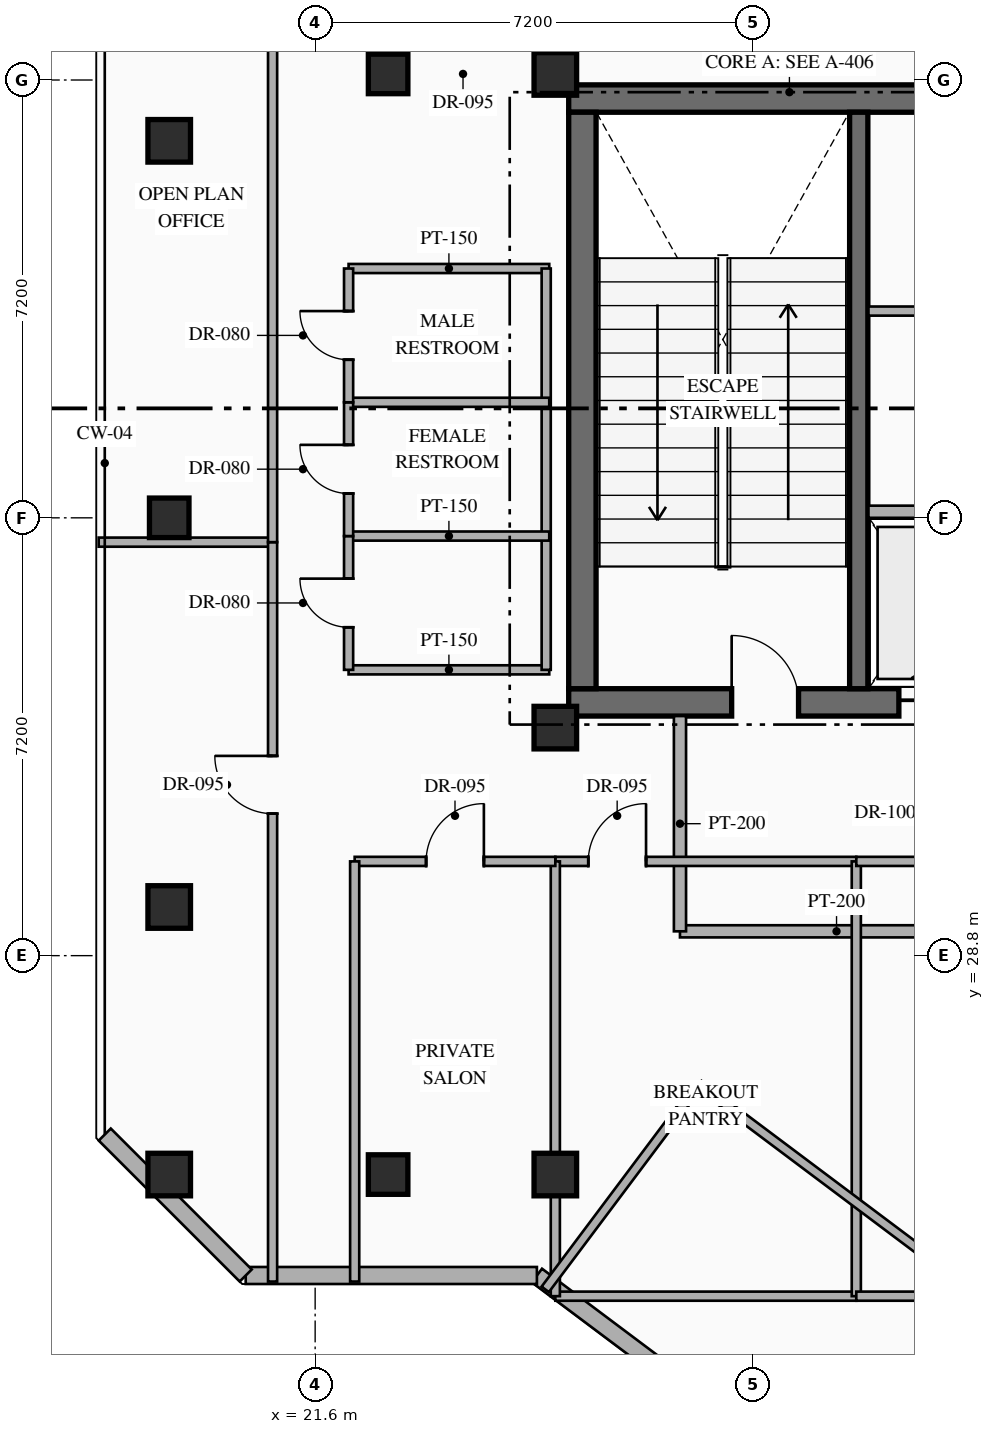
"""IFC4 building model, lengths in metres.
Left out: names, types, materials, properties, quantities, classifications, styles, units other than length and angle.
Written with IfcOpenShell. Run it as: python <this file> out.ifc"""

import sys

from ifc_helpers import new_model, si_unit, direction, frame, frame_2d, origin, origin_2d, place, context, subcontext, project, spatial, rectangle, hollow_rectangle, extrude, element, fill, save


model = new_model("IFC4")
c1 = context("Model", 3, precision=1e-05, world=origin(), true_north=direction((0.0, 1.0)))
c2 = subcontext(c1, "Body", "Model", "MODEL_VIEW")
j1 = project(units=[si_unit("LENGTHUNIT", "METRE"), si_unit("PLANEANGLEUNIT", "RADIAN")], contexts=[c1])
p1 = place(None, origin())
s1 = spatial("IfcSite", under=j1, at=p1, CompositionType="ELEMENT")
p2 = place(p1, origin())
s2 = spatial("IfcBuilding", under=s1, at=p2, CompositionType="ELEMENT")
p3 = place(p2, frame((0.0, 0.0, 234.75)))
s3 = spatial("IfcBuildingStorey", under=s2, at=p3, CompositionType="ELEMENT", Elevation=234.75)
p4 = place(p3, frame((25.77, 32.965, 0.0), z_axis=(0.0, 0.0, 1.0), x_axis=(1.0, 0.0, 0.0)))
e1 = element("IfcWall", 1, at=p4, inside=s3, PredefinedType="SHEAR", context=c2, shape_type="SweptSolid", body=[
    extrude(rectangle(XDim=7.48, YDim=0.45, at=frame_2d((3.74, 0.0))), origin(), (0.0, 0.0, 1.0), 4.8),
])
p5 = place(p4, frame((2.68, 0.0, 0.0)))
e2 = element("IfcOpeningElement", 2, at=p5, cuts=e1, PredefinedType="OPENING", context=c2, shape_type="SweptSolid", body=[
    extrude(rectangle(XDim=1.1, YDim=2.2, at=frame_2d((0.55, 1.1))), frame((0.0, 0.235, 0.0), z_axis=(0.0, -1.0, 0.0), x_axis=(1.0, 0.0, 0.0)), (0.0, 0.0, 1.0), 0.47),
])
p6 = place(p4, frame((5.43, 0.0, 0.0)))
e3 = element("IfcOpeningElement", 3, at=p6, cuts=e1, PredefinedType="OPENING", context=c2, shape_type="SweptSolid", body=[
    extrude(rectangle(XDim=1.1, YDim=2.15, at=frame_2d((0.55, 1.075))), frame((0.0, 0.235, 0.0), z_axis=(0.0, -1.0, 0.0), x_axis=(1.0, 0.0, 0.0)), (0.0, 0.0, 1.0), 0.47),
])
p7 = place(p3, frame((25.77, 42.895, 0.0), z_axis=(0.0, 0.0, 1.0), x_axis=(1.0, 0.0, 0.0)))
e4 = element("IfcWall", 4, at=p7, inside=s3, PredefinedType="SHEAR", context=c2, shape_type="SweptSolid", body=[
    extrude(rectangle(XDim=7.48, YDim=0.45, at=frame_2d((3.74, 0.0))), origin(), (0.0, 0.0, 1.0), 4.8),
])
p8 = place(p3, frame((25.995, 33.19, 0.0), z_axis=(0.0, 0.0, 1.0), x_axis=(0.0, 1.0, 0.0)))
e5 = element("IfcWall", 5, at=p8, inside=s3, PredefinedType="SHEAR", context=c2, shape_type="SweptSolid", body=[
    extrude(rectangle(XDim=9.48, YDim=0.45, at=frame_2d((4.74, 0.0))), origin(), (0.0, 0.0, 1.0), 4.8),
])
p9 = place(p3, frame((30.54, 33.19, 0.0), z_axis=(0.0, 0.0, 1.0), x_axis=(0.0, 1.0, 0.0)))
e6 = element("IfcWall", 6, at=p9, inside=s3, PredefinedType="SHEAR", context=c2, shape_type="SweptSolid", body=[
    extrude(rectangle(XDim=9.48, YDim=0.3, at=frame_2d((4.74, 0.0))), origin(), (0.0, 0.0, 1.0), 4.8),
])
for number, where, z_axis, x_axis in (
    (7, (25.55, 32.55, 0.0), (0.0, 0.0, 1.0), (1.0, 0.0, 0.0)),
    (8, (25.55, 43.3, 0.0), (0.0, 0.0, 1.0), (1.0, 0.0, 0.0)),
    (9, (25.55, 25.2, 0.0), (0.0, 0.0, 1.0), (1.0, 0.0, 0.0)),
    (10, (19.2, 25.2, 0.0), (0.0, 0.0, 1.0), (1.0, 0.0, 0.0)),
    (11, (19.2, 29.6, 0.0), (0.0, 0.0, 1.0), (1.0, 0.0, 0.0)),
    (12, (19.2, 42.2, 0.0), (0.0, 0.0, 1.0), (1.0, 0.0, 0.0)),
):
    element("IfcColumn", number, at=place(p3, frame(where, z_axis=z_axis, x_axis=x_axis)), inside=s3, PredefinedType="COLUMN", context=c2, shape_type="SweptSolid", body=[
        extrude(hollow_rectangle(XDim=0.7, YDim=0.7, WallThickness=0.028, at=origin_2d()), origin(), (0.0, 0.0, 1.0), 4.8),
    ])
for number, where, z_axis, x_axis in (
    (13, (22.8, 25.2, 0.0), (0.0, 0.0, 1.0), (1.0, 0.0, 0.0)),
    (14, (22.8, 43.3, 0.0), (0.0, 0.0, 1.0), (1.0, 0.0, 0.0)),
    (15, (19.2, 36.0, 0.0), (0.0, 0.0, 1.0), (1.0, 0.0, 0.0)),
):
    element("IfcColumn", number, at=place(p3, frame(where, z_axis=z_axis, x_axis=x_axis)), inside=s3, PredefinedType="COLUMN", context=c2, shape_type="SweptSolid", body=[
        extrude(hollow_rectangle(XDim=0.65, YDim=0.65, WallThickness=0.025, at=origin_2d()), origin(), (0.0, 0.0, 1.0), 4.8),
    ])
p10 = place(p3, frame((37.718, 14.187, 0.0), z_axis=(0.0, 0.0, 1.0), x_axis=(-0.800005638109, 0.599992482448, 0.0)))
e16 = element("IfcWall", 16, at=p10, inside=s3, PredefinedType="STANDARD", context=c2, shape_type="SweptSolid", body=[
    extrude(rectangle(XDim=15.589, YDim=0.28, at=frame_2d((7.794, 0.0))), origin(), (0.0, 0.0, 1.0), 4.55),
])
p11 = place(p3, frame((25.247, 23.54, 0.0), z_axis=(0.0, 0.0, 1.0), x_axis=(-1.0, 0.0, 0.0)))
e17 = element("IfcWall", 17, at=p11, inside=s3, PredefinedType="STANDARD", context=c2, shape_type="SweptSolid", body=[
    extrude(rectangle(XDim=4.789, YDim=0.28, at=frame_2d((2.395, 0.0))), origin(), (0.0, 0.0, 1.0), 4.55),
])
p12 = place(p3, frame((20.458, 23.54, 0.0), z_axis=(0.0, 0.0, 1.0), x_axis=(-0.707144017911, 0.707069542501, 0.0)))
e18 = element("IfcWall", 18, at=p12, inside=s3, PredefinedType="STANDARD", context=c2, shape_type="SweptSolid", body=[
    extrude(rectangle(XDim=3.278, YDim=0.28, at=frame_2d((1.639, 0.0))), origin(), (0.0, 0.0, 1.0), 4.55),
])
p13 = place(p3, frame((30.7, 36.1, 0.0), z_axis=(0.0, 0.0, 1.0), x_axis=(1.0, 0.0, 0.0)))
e19 = element("IfcWall", 19, at=p13, inside=s3, PredefinedType="STANDARD", context=c2, shape_type="SweptSolid", body=[
    extrude(rectangle(XDim=2.1, YDim=0.2, at=frame_2d((1.05, 0.0))), origin(), (0.0, 0.0, 1.0), 4.55),
])
p14 = place(p3, frame((30.7, 39.4, 0.0), z_axis=(0.0, 0.0, 1.0), x_axis=(1.0, 0.0, 0.0)))
e20 = element("IfcWall", 20, at=p14, inside=s3, PredefinedType="PARTITIONING", context=c2, shape_type="SweptSolid", body=[
    extrude(rectangle(XDim=2.1, YDim=0.15, at=frame_2d((1.05, 0.0))), origin(), (0.0, 0.0, 1.0), 4.55),
])
p15 = place(p3, frame((27.6, 29.2, 0.0), z_axis=(0.0, 0.0, 1.0), x_axis=(1.0, 0.0, 0.0)))
e21 = element("IfcWall", 21, at=p15, inside=s3, PredefinedType="STANDARD", context=c2, shape_type="SweptSolid", body=[
    extrude(rectangle(XDim=5.15, YDim=0.2, at=frame_2d((2.575, 0.0))), origin(), (0.0, 0.0, 1.0), 4.55),
])
p16 = place(p3, frame((27.6, 29.2, 0.0), z_axis=(0.0, 0.0, 1.0), x_axis=(0.0, 1.0, 0.0)))
e22 = element("IfcWall", 22, at=p16, inside=s3, PredefinedType="STANDARD", context=c2, shape_type="SweptSolid", body=[
    extrude(rectangle(XDim=3.54, YDim=0.2, at=frame_2d((1.77, 0.0))), origin(), (0.0, 0.0, 1.0), 4.55),
])
for number, where, z_axis, x_axis in (
    (23, (22.15, 33.5, 0.0), (0.0, 0.0, 1.0), (1.0, 0.0, 0.0)),
    (24, (22.15, 40.1, 0.0), (0.0, 0.0, 1.0), (1.0, 0.0, 0.0)),
):
    element("IfcWall", number, at=place(p3, frame(where, z_axis=z_axis, x_axis=x_axis)), inside=s3, PredefinedType="PARTITIONING", context=c2, shape_type="SweptSolid", body=[
        extrude(rectangle(XDim=3.3, YDim=0.15, at=frame_2d((1.65, 0.0))), origin(), (0.0, 0.0, 1.0), 4.55),
    ])
p17 = place(p3, frame((25.4, 33.5, 0.0), z_axis=(0.0, 0.0, 1.0), x_axis=(0.0, 1.0, 0.0)))
e25 = element("IfcWall", 25, at=p17, inside=s3, PredefinedType="PARTITIONING", context=c2, shape_type="SweptSolid", body=[
    extrude(rectangle(XDim=6.6, YDim=0.15, at=frame_2d((3.3, 0.0))), origin(), (0.0, 0.0, 1.0), 4.55),
])
for number, where, z_axis, x_axis in (
    (26, (22.15, 35.7, 0.0), (0.0, 0.0, 1.0), (1.0, 0.0, 0.0)),
    (27, (22.15, 37.9, 0.0), (0.0, 0.0, 1.0), (1.0, 0.0, 0.0)),
):
    element("IfcWall", number, at=place(p3, frame(where, z_axis=z_axis, x_axis=x_axis)), inside=s3, PredefinedType="PARTITIONING", context=c2, shape_type="SweptSolid", body=[
        extrude(rectangle(XDim=3.3, YDim=0.15, at=frame_2d((1.65, 0.0))), origin(), (0.0, 0.0, 1.0), 4.55),
    ])
p18 = place(p3, frame((22.15, 33.5, 0.0), z_axis=(0.0, 0.0, 1.0), x_axis=(0.0, 1.0, 0.0)))
e28 = element("IfcWall", 28, at=p18, inside=s3, PredefinedType="PARTITIONING", context=c2, shape_type="SweptSolid", body=[
    extrude(rectangle(XDim=2.2, YDim=0.15, at=frame_2d((1.1, 0.0))), origin(), (0.0, 0.0, 1.0), 4.55),
])
p19 = place(p18, frame((0.7, 0.0, 0.0)))
e29 = element("IfcOpeningElement", 29, at=p19, cuts=e28, PredefinedType="OPENING", context=c2, shape_type="SweptSolid", body=[
    extrude(rectangle(XDim=0.8, YDim=2.06, at=frame_2d((0.4, 1.03))), frame((0.0, 0.085, 0.0), z_axis=(0.0, -1.0, 0.0), x_axis=(1.0, 0.0, 0.0)), (0.0, 0.0, 1.0), 0.17),
])
p20 = place(p3, frame((22.15, 35.7, 0.0), z_axis=(0.0, 0.0, 1.0), x_axis=(0.0, 1.0, 0.0)))
e30 = element("IfcWall", 30, at=p20, inside=s3, PredefinedType="PARTITIONING", context=c2, shape_type="SweptSolid", body=[
    extrude(rectangle(XDim=2.2, YDim=0.15, at=frame_2d((1.1, 0.0))), origin(), (0.0, 0.0, 1.0), 4.55),
])
p21 = place(p20, frame((0.7, 0.0, 0.0)))
e31 = element("IfcOpeningElement", 31, at=p21, cuts=e30, PredefinedType="OPENING", context=c2, shape_type="SweptSolid", body=[
    extrude(rectangle(XDim=0.8, YDim=2.06, at=frame_2d((0.4, 1.03))), frame((0.0, 0.085, 0.0), z_axis=(0.0, -1.0, 0.0), x_axis=(1.0, 0.0, 0.0)), (0.0, 0.0, 1.0), 0.17),
])
p22 = place(p3, frame((22.15, 37.9, 0.0), z_axis=(0.0, 0.0, 1.0), x_axis=(0.0, 1.0, 0.0)))
e32 = element("IfcWall", 32, at=p22, inside=s3, PredefinedType="PARTITIONING", context=c2, shape_type="SweptSolid", body=[
    extrude(rectangle(XDim=2.2, YDim=0.15, at=frame_2d((1.1, 0.0))), origin(), (0.0, 0.0, 1.0), 4.55),
])
p23 = place(p22, frame((0.7, 0.0, 0.0)))
e33 = element("IfcOpeningElement", 33, at=p23, cuts=e32, PredefinedType="OPENING", context=c2, shape_type="SweptSolid", body=[
    extrude(rectangle(XDim=0.8, YDim=2.06, at=frame_2d((0.4, 1.03))), frame((0.0, 0.085, 0.0), z_axis=(0.0, -1.0, 0.0), x_axis=(1.0, 0.0, 0.0)), (0.0, 0.0, 1.0), 0.17),
])
p24 = place(p3, frame((25.55, 23.2, 0.0), z_axis=(0.0, 0.0, 1.0), x_axis=(1.0, 0.0, 0.0)))
e34 = element("IfcWall", 34, at=p24, inside=s3, PredefinedType="PARTITIONING", context=c2, shape_type="SweptSolid", body=[
    extrude(rectangle(XDim=4.95, YDim=0.15, at=frame_2d((2.475, 0.0))), origin(), (0.0, 0.0, 1.0), 4.55),
])
p25 = place(p3, frame((25.55, 30.35, 0.0), z_axis=(0.0, 0.0, 1.0), x_axis=(1.0, 0.0, 0.0)))
e35 = element("IfcWall", 35, at=p25, inside=s3, PredefinedType="PARTITIONING", context=c2, shape_type="SweptSolid", body=[
    extrude(rectangle(XDim=4.95, YDim=0.15, at=frame_2d((2.475, 0.0))), origin(), (0.0, 0.0, 1.0), 4.55),
])
p26 = place(p25, frame((0.542, 0.0, 0.0)))
e36 = element("IfcOpeningElement", 36, at=p26, cuts=e35, PredefinedType="OPENING", context=c2, shape_type="SweptSolid", body=[
    extrude(rectangle(XDim=0.95, YDim=2.15, at=frame_2d((0.475, 1.075))), frame((0.0, 0.085, 0.0), z_axis=(0.0, -1.0, 0.0), x_axis=(1.0, 0.0, 0.0)), (0.0, 0.0, 1.0), 0.17),
])
p27 = place(p3, frame((25.55, 23.2, 0.0), z_axis=(0.0, 0.0, 1.0), x_axis=(0.0, 1.0, 0.0)))
e37 = element("IfcWall", 37, at=p27, inside=s3, PredefinedType="PARTITIONING", context=c2, shape_type="SweptSolid", body=[
    extrude(rectangle(XDim=7.15, YDim=0.15, at=frame_2d((3.575, 0.0))), origin(), (0.0, 0.0, 1.0), 3.745),
])
p28 = place(p3, frame((30.5, 23.2, 0.0), z_axis=(0.0, 0.0, 1.0), x_axis=(0.0, 1.0, 0.0)))
e38 = element("IfcWall", 38, at=p28, inside=s3, PredefinedType="PARTITIONING", context=c2, shape_type="SweptSolid", body=[
    extrude(rectangle(XDim=7.15, YDim=0.15, at=frame_2d((3.575, 0.0))), origin(), (0.0, 0.0, 1.0), 4.55),
])
p29 = place(p3, frame((30.5, 23.2, 0.0), z_axis=(0.0, 0.0, 1.0), x_axis=(1.0, 0.0, 0.0)))
e39 = element("IfcWall", 39, at=p29, inside=s3, PredefinedType="PARTITIONING", context=c2, shape_type="SweptSolid", body=[
    extrude(rectangle(XDim=4.45, YDim=0.15, at=frame_2d((2.225, 0.0))), origin(), (0.0, 0.0, 1.0), 4.55),
])
p30 = place(p3, frame((30.5, 30.35, 0.0), z_axis=(0.0, 0.0, 1.0), x_axis=(1.0, 0.0, 0.0)))
e40 = element("IfcWall", 40, at=p30, inside=s3, PredefinedType="PARTITIONING", context=c2, shape_type="SweptSolid", body=[
    extrude(rectangle(XDim=4.45, YDim=0.15, at=frame_2d((2.225, 0.0))), origin(), (0.0, 0.0, 1.0), 4.55),
])
p31 = place(p30, frame((2.846, 0.0, 0.0)))
e41 = element("IfcOpeningElement", 41, at=p31, cuts=e40, PredefinedType="OPENING", context=c2, shape_type="SweptSolid", body=[
    extrude(rectangle(XDim=0.95, YDim=2.15, at=frame_2d((0.475, 1.075))), frame((0.0, 0.085, 0.0), z_axis=(0.0, -1.0, 0.0), x_axis=(1.0, 0.0, 0.0)), (0.0, 0.0, 1.0), 0.17),
])
p32 = place(p3, frame((18.04, 35.6, 0.0), z_axis=(0.0, 0.0, 1.0), x_axis=(1.0, 0.0, 0.0)))
e42 = element("IfcWall", 42, at=p32, inside=s3, PredefinedType="PARTITIONING", context=c2, shape_type="SweptSolid", body=[
    extrude(rectangle(XDim=2.86, YDim=0.15, at=frame_2d((1.43, 0.0))), origin(), (0.0, 0.0, 1.0), 4.55),
])
p33 = place(p3, frame((20.9, 23.44, 0.0), z_axis=(0.0, 0.0, 1.0), x_axis=(0.0, 1.0, 0.0)))
e43 = element("IfcWall", 43, at=p33, inside=s3, PredefinedType="PARTITIONING", context=c2, shape_type="SweptSolid", body=[
    extrude(rectangle(XDim=12.16, YDim=0.15, at=frame_2d((6.08, 0.0))), origin(), (0.0, 0.0, 1.0), 4.55),
])
p34 = place(p33, frame((7.695, 0.0, 0.0)))
e44 = element("IfcOpeningElement", 44, at=p34, cuts=e43, PredefinedType="OPENING", context=c2, shape_type="SweptSolid", body=[
    extrude(rectangle(XDim=0.95, YDim=2.15, at=frame_2d((0.475, 1.075))), frame((0.0, 0.085, 0.0), z_axis=(0.0, -1.0, 0.0), x_axis=(1.0, 0.0, 0.0)), (0.0, 0.0, 1.0), 0.17),
])
p35 = place(p3, frame((20.9, 35.6, 0.0), z_axis=(0.0, 0.0, 1.0), x_axis=(0.0, 1.0, 0.0)))
e45 = element("IfcWall", 45, at=p35, inside=s3, PredefinedType="PARTITIONING", context=c2, shape_type="SweptSolid", body=[
    extrude(rectangle(XDim=14.76, YDim=0.15, at=frame_2d((7.38, 0.0))), origin(), (0.0, 0.0, 1.0), 4.55),
])
p36 = place(p35, frame((9.515, 0.0, 0.0)))
e46 = element("IfcOpeningElement", 46, at=p36, cuts=e45, PredefinedType="OPENING", context=c2, shape_type="SweptSolid", body=[
    extrude(rectangle(XDim=0.95, YDim=2.15, at=frame_2d((0.475, 1.075))), frame((0.0, 0.085, 0.0), z_axis=(0.0, -1.0, 0.0), x_axis=(1.0, 0.0, 0.0)), (0.0, 0.0, 1.0), 0.17),
])
p37 = place(p3, frame((22.25, 30.35, 0.0), z_axis=(0.0, 0.0, 1.0), x_axis=(1.0, 0.0, 0.0)))
e47 = element("IfcWall", 47, at=p37, inside=s3, PredefinedType="PARTITIONING", context=c2, shape_type="SweptSolid", body=[
    extrude(rectangle(XDim=3.3, YDim=0.15, at=frame_2d((1.65, 0.0))), origin(), (0.0, 0.0, 1.0), 4.55),
])
p38 = place(p37, frame((1.175, 0.0, 0.0)))
e48 = element("IfcOpeningElement", 48, at=p38, cuts=e47, PredefinedType="OPENING", context=c2, shape_type="SweptSolid", body=[
    extrude(rectangle(XDim=0.95, YDim=2.15, at=frame_2d((0.475, 1.075))), frame((0.0, 0.085, 0.0), z_axis=(0.0, -1.0, 0.0), x_axis=(1.0, 0.0, 0.0)), (0.0, 0.0, 1.0), 0.17),
])
p39 = place(p3, frame((22.25, 23.44, 0.0), z_axis=(0.0, 0.0, 1.0), x_axis=(0.0, 1.0, 0.0)))
e49 = element("IfcWall", 49, at=p39, inside=s3, PredefinedType="PARTITIONING", context=c2, shape_type="SweptSolid", body=[
    extrude(rectangle(XDim=6.91, YDim=0.15, at=frame_2d((3.455, 0.0))), origin(), (0.0, 0.0, 1.0), 4.55),
])
p40 = place(p3, frame((27.91, 26.68, 0.0), z_axis=(0.0, 0.0, 1.0), x_axis=(0.8, -0.6, 0.0)))
e50 = element("IfcWall", 50, at=p40, inside=s3, PredefinedType="PARTITIONING", context=c2, shape_type="SweptSolid", body=[
    extrude(rectangle(XDim=17.76, YDim=0.15, at=frame_2d((8.88, 0.0))), origin(), (0.0, 0.0, 1.0), 4.55),
])
p41 = place(p40, frame((14.986, 0.0, 0.0)))
e51 = element("IfcOpeningElement", 51, at=p41, cuts=e50, PredefinedType="OPENING", context=c2, shape_type="SweptSolid", body=[
    extrude(rectangle(XDim=0.95, YDim=2.15, at=frame_2d((0.475, 1.075))), frame((0.0, 0.085, 0.0), z_axis=(0.0, -1.0, 0.0), x_axis=(1.0, 0.0, 0.0)), (0.0, 0.0, 1.0), 0.17),
])
p42 = place(p3, frame((25.384, 23.312, 0.0), z_axis=(0.0, 0.0, 1.0), x_axis=(0.599990721155, 0.80000695905, 0.0)))
e52 = element("IfcWall", 52, at=p42, inside=s3, PredefinedType="PARTITIONING", context=c2, shape_type="SweptSolid", body=[
    extrude(rectangle(XDim=4.21, YDim=0.15, at=frame_2d((2.105, 0.0))), origin(), (0.0, 0.0, 1.0), 4.55),
])
p43 = place(p5, origin())
e53 = element("IfcDoor", 53, at=p43, inside=s3, OperationType="SINGLE_SWING_LEFT", PredefinedType="DOOR", context=c2, shape_type="SweptSolid", body=[
    extrude(rectangle(XDim=1.1, YDim=2.2, at=frame_2d((0.55, 1.1))), frame((0.0, 0.025, 0.0), z_axis=(0.0, -1.0, 0.0), x_axis=(1.0, 0.0, 0.0)), (0.0, 0.0, 1.0), 0.05),
])
fill(e2, e53)
p44 = place(p6, origin())
e54 = element("IfcDoor", 54, at=p44, inside=s3, OperationType="SLIDING_TO_LEFT", PredefinedType="USERDEFINED", context=c2, shape_type="SweptSolid", body=[
    extrude(rectangle(XDim=1.1, YDim=2.15, at=frame_2d((0.55, 1.075))), frame((0.0, 0.025, 0.0), z_axis=(0.0, -1.0, 0.0), x_axis=(1.0, 0.0, 0.0)), (0.0, 0.0, 1.0), 0.05),
])
fill(e3, e54)
p45 = place(p19, origin())
e55 = element("IfcDoor", 55, at=p45, inside=s3, OperationType="SINGLE_SWING_RIGHT", PredefinedType="DOOR", context=c2, shape_type="SweptSolid", body=[
    extrude(rectangle(XDim=0.8, YDim=2.06, at=frame_2d((0.4, 1.03))), frame((0.0, 0.025, 0.0), z_axis=(0.0, -1.0, 0.0), x_axis=(1.0, 0.0, 0.0)), (0.0, 0.0, 1.0), 0.05),
])
fill(e29, e55)
p46 = place(p21, origin())
e56 = element("IfcDoor", 56, at=p46, inside=s3, OperationType="SINGLE_SWING_RIGHT", PredefinedType="DOOR", context=c2, shape_type="SweptSolid", body=[
    extrude(rectangle(XDim=0.8, YDim=2.06, at=frame_2d((0.4, 1.03))), frame((0.0, 0.025, 0.0), z_axis=(0.0, -1.0, 0.0), x_axis=(1.0, 0.0, 0.0)), (0.0, 0.0, 1.0), 0.05),
])
fill(e31, e56)
p47 = place(p23, origin())
e57 = element("IfcDoor", 57, at=p47, inside=s3, OperationType="SINGLE_SWING_RIGHT", PredefinedType="DOOR", context=c2, shape_type="SweptSolid", body=[
    extrude(rectangle(XDim=0.8, YDim=2.06, at=frame_2d((0.4, 1.03))), frame((0.0, 0.025, 0.0), z_axis=(0.0, -1.0, 0.0), x_axis=(1.0, 0.0, 0.0)), (0.0, 0.0, 1.0), 0.05),
])
fill(e33, e57)
p48 = place(p26, origin())
e58 = element("IfcDoor", 58, at=p48, inside=s3, OperationType="SINGLE_SWING_RIGHT", PredefinedType="DOOR", context=c2, shape_type="SweptSolid", body=[
    extrude(rectangle(XDim=0.95, YDim=2.15, at=frame_2d((0.475, 1.075))), frame((0.0, 0.025, 0.0), z_axis=(0.0, -1.0, 0.0), x_axis=(1.0, 0.0, 0.0)), (0.0, 0.0, 1.0), 0.05),
])
fill(e36, e58)
p49 = place(p34, origin())
e59 = element("IfcDoor", 59, at=p49, inside=s3, OperationType="SINGLE_SWING_RIGHT", PredefinedType="DOOR", context=c2, shape_type="SweptSolid", body=[
    extrude(rectangle(XDim=0.95, YDim=2.15, at=frame_2d((0.475, 1.075))), frame((0.0, 0.025, 0.0), z_axis=(0.0, -1.0, 0.0), x_axis=(1.0, 0.0, 0.0)), (0.0, 0.0, 1.0), 0.05),
])
fill(e44, e59)
p50 = place(p38, origin())
e60 = element("IfcDoor", 60, at=p50, inside=s3, OperationType="SINGLE_SWING_RIGHT", PredefinedType="DOOR", context=c2, shape_type="SweptSolid", body=[
    extrude(rectangle(XDim=0.95, YDim=2.15, at=frame_2d((0.475, 1.075))), frame((0.0, 0.025, 0.0), z_axis=(0.0, -1.0, 0.0), x_axis=(1.0, 0.0, 0.0)), (0.0, 0.0, 1.0), 0.05),
])
fill(e48, e60)
save(model, sys.argv[1])
